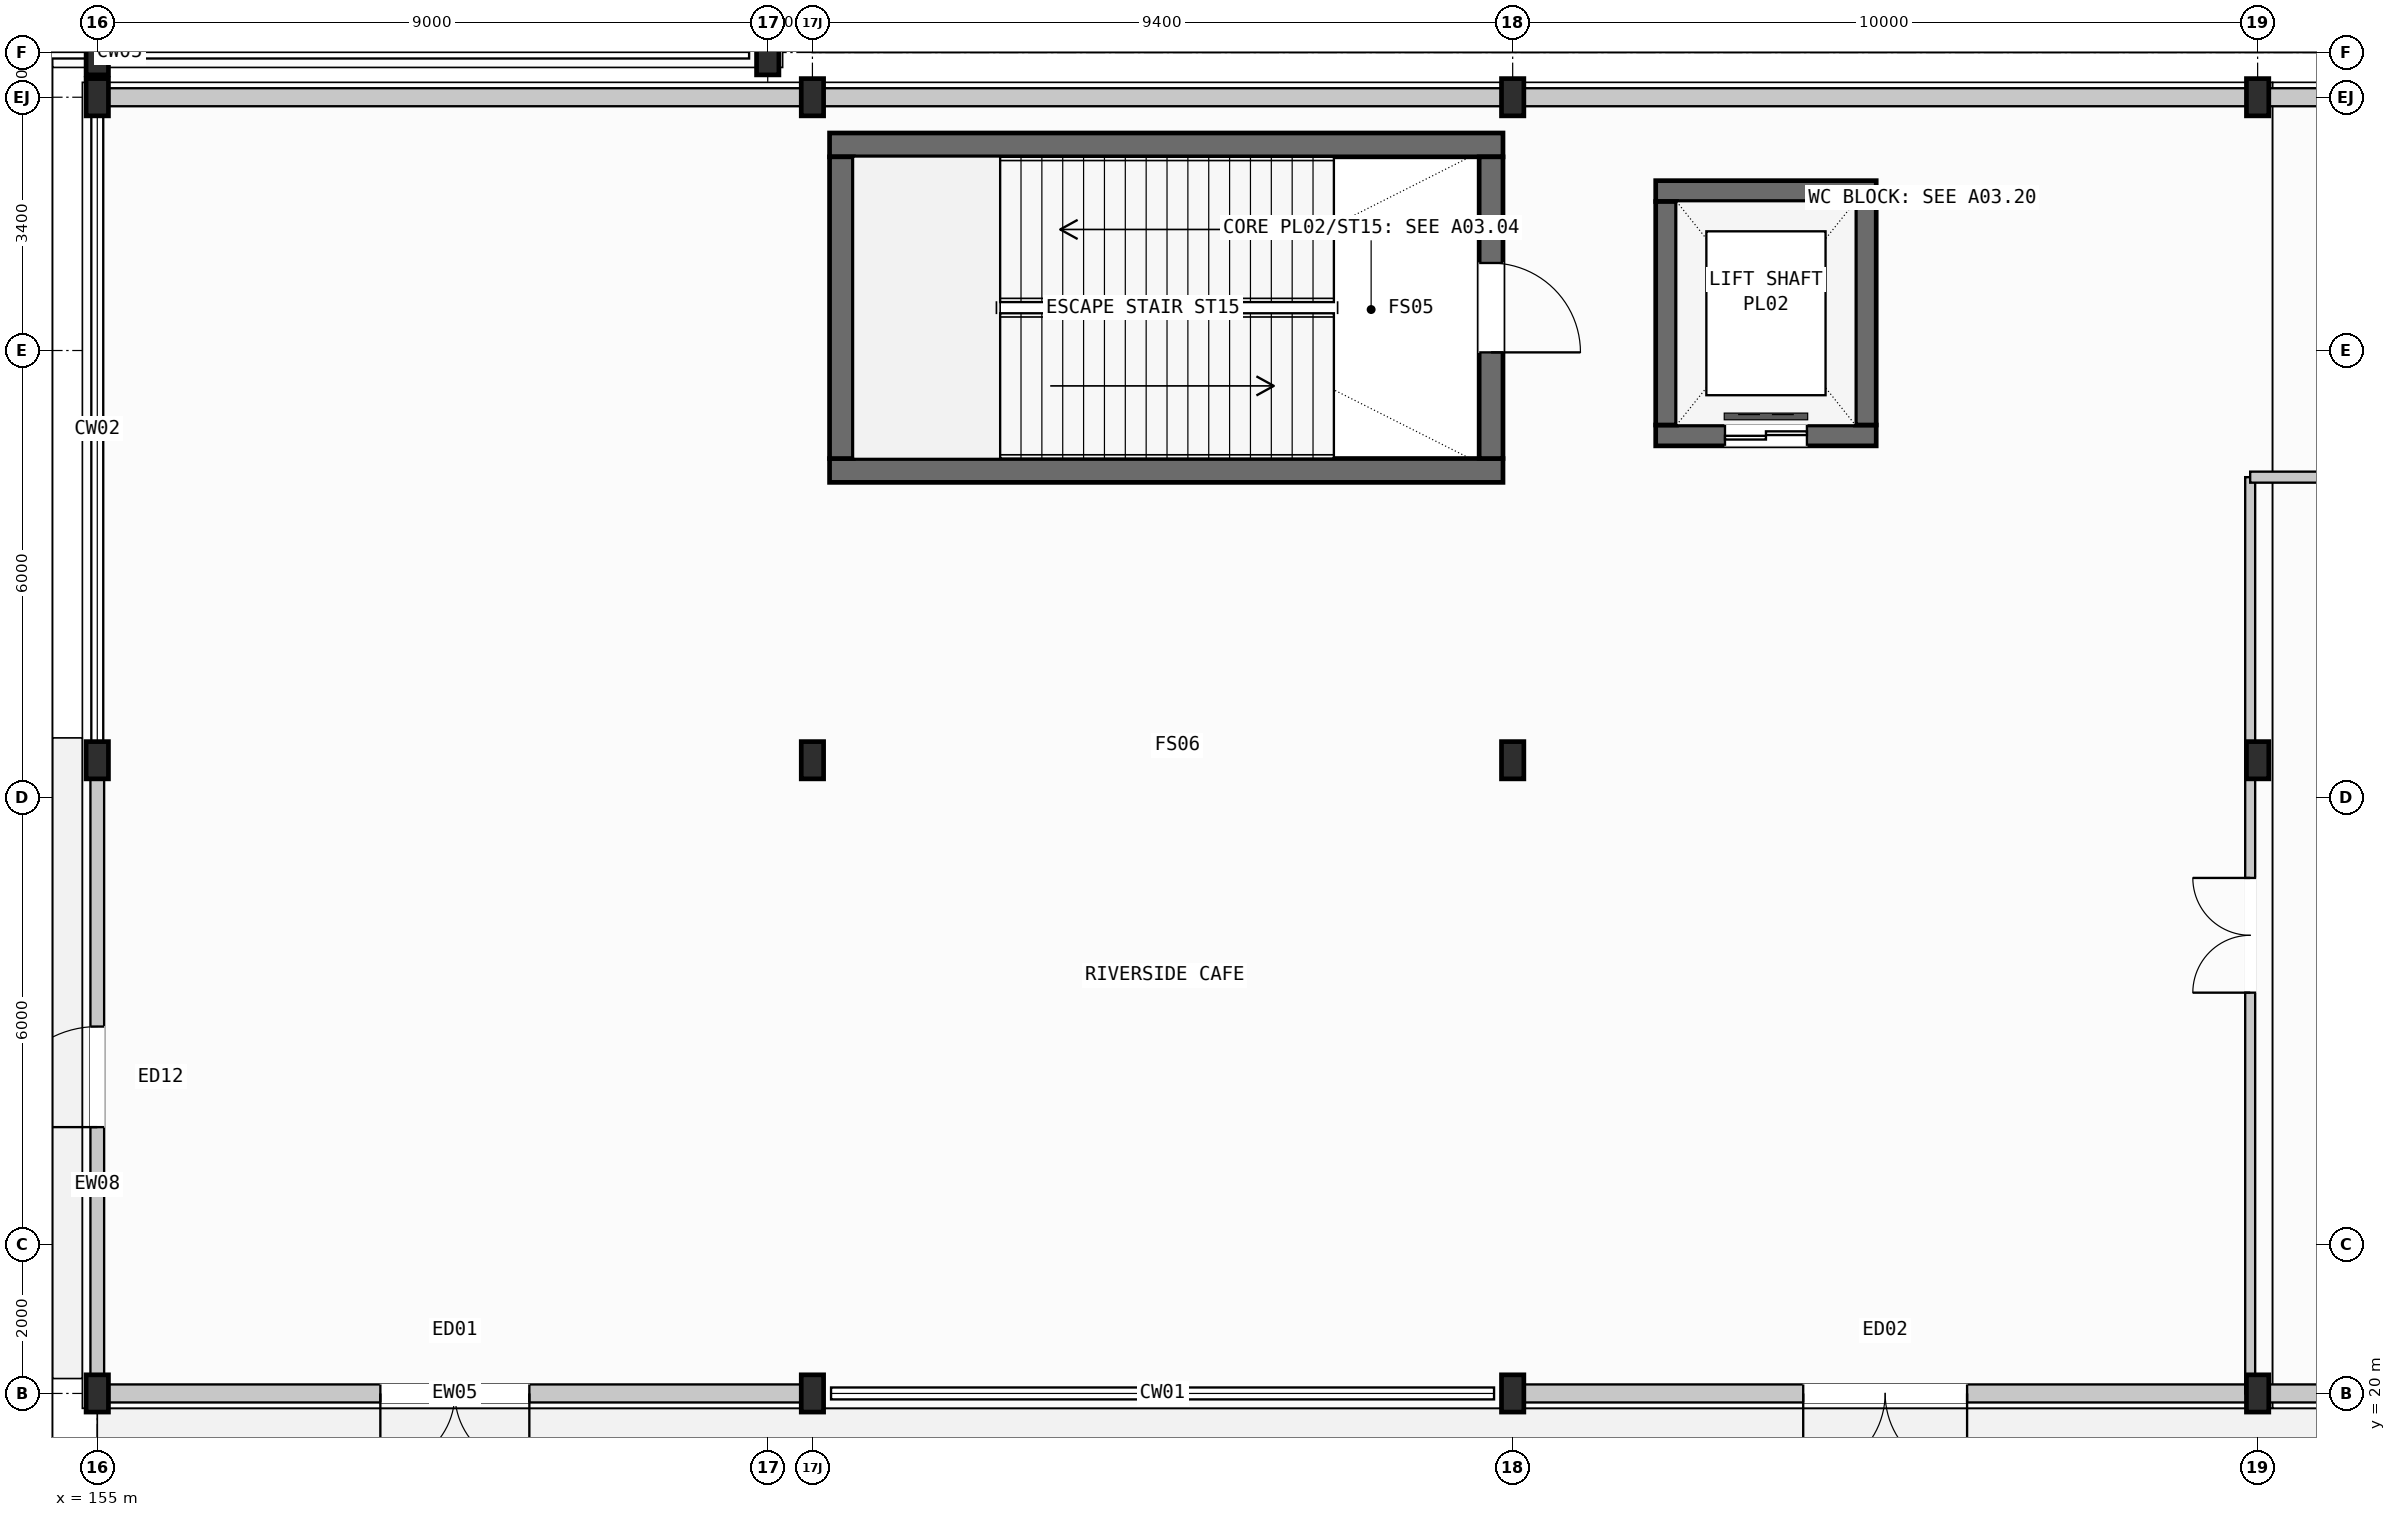
"""IFC4 building model, lengths in metres.
Left out: names, types, materials, properties, quantities, classifications, styles, units other than length and angle.
Written with IfcOpenShell. Run it as: python <this file> out.ifc"""

import sys

from ifc_helpers import new_model, si_unit, direction, frame, frame_2d, origin, origin_2d, place, context, subcontext, project, spatial, rectangle, i_section, extrude, element, fill, save


model = new_model("IFC4")
c1 = context("Model", 3, precision=1e-05, world=origin(), true_north=direction((0.0, 1.0)))
c2 = subcontext(c1, "Body", "Model", "MODEL_VIEW")
j1 = project(units=[si_unit("LENGTHUNIT", "METRE"), si_unit("PLANEANGLEUNIT", "RADIAN")], contexts=[c1])
p1 = place(None, origin())
s1 = spatial("IfcSite", under=j1, at=p1, CompositionType="ELEMENT")
p2 = place(p1, origin())
s2 = spatial("IfcBuilding", under=s1, at=p2, CompositionType="ELEMENT")
p3 = place(p2, origin())
s3 = spatial("IfcBuildingStorey", under=s2, at=p3, CompositionType="ELEMENT", Elevation=0.0)
for number, where, z_axis, x_axis in (
    (1, (155.0, 20.0, 0.0), (0.0, 0.0, 1.0), (1.0, 0.0, 0.0)),
    (2, (155.0, 28.5, 0.0), (0.0, 0.0, 1.0), (1.0, 0.0, 0.0)),
    (3, (155.0, 37.4, 0.0), (0.0, 0.0, 1.0), (1.0, 0.0, 0.0)),
):
    element("IfcColumn", number, at=place(p3, frame(where, z_axis=z_axis, x_axis=x_axis)), inside=s3, PredefinedType="COLUMN", context=c2, shape_type="SweptSolid", body=[
        extrude(i_section(OverallWidth=0.3, OverallDepth=0.5, WebThickness=0.014, FlangeThickness=0.028, FilletRadius=0.027, at=origin_2d()), origin(), (0.0, 0.0, 1.0), 6.0),
    ])
for number, where, z_axis, x_axis in (
    (4, (155.0, 38.0, 0.0), (0.0, 0.0, 1.0), (1.0, 0.0, 0.0)),
    (5, (164.0, 38.0, 0.0), (0.0, 0.0, 1.0), (1.0, 0.0, 0.0)),
):
    element("IfcColumn", number, at=place(p3, frame(where, z_axis=z_axis, x_axis=x_axis)), inside=s3, PredefinedType="COLUMN", context=c2, shape_type="SweptSolid", body=[
        extrude(i_section(OverallWidth=0.3, OverallDepth=0.6, WebThickness=0.015, FlangeThickness=0.03, FilletRadius=0.027, at=origin_2d()), origin(), (0.0, 0.0, 1.0), 6.0),
    ])
for number, where, z_axis, x_axis in (
    (6, (164.6, 20.0, 0.0), (0.0, 0.0, 1.0), (1.0, 0.0, 0.0)),
    (7, (164.6, 28.5, 0.0), (0.0, 0.0, 1.0), (1.0, 0.0, 0.0)),
    (8, (164.6, 37.4, 0.0), (0.0, 0.0, 1.0), (1.0, 0.0, 0.0)),
    (9, (174.0, 20.0, 0.0), (0.0, 0.0, 1.0), (1.0, 0.0, 0.0)),
    (10, (174.0, 28.5, 0.0), (0.0, 0.0, 1.0), (1.0, 0.0, 0.0)),
    (11, (174.0, 37.4, 0.0), (0.0, 0.0, 1.0), (1.0, 0.0, 0.0)),
    (12, (184.0, 20.0, 0.0), (0.0, 0.0, 1.0), (1.0, 0.0, 0.0)),
    (13, (184.0, 28.5, 0.0), (0.0, 0.0, 1.0), (1.0, 0.0, 0.0)),
    (14, (184.0, 37.4, 0.0), (0.0, 0.0, 1.0), (1.0, 0.0, 0.0)),
):
    element("IfcColumn", number, at=place(p3, frame(where, z_axis=z_axis, x_axis=x_axis)), inside=s3, PredefinedType="COLUMN", context=c2, shape_type="SweptSolid", body=[
        extrude(i_section(OverallWidth=0.3, OverallDepth=0.5, WebThickness=0.014, FlangeThickness=0.028, FilletRadius=0.027, at=origin_2d()), origin(), (0.0, 0.0, 1.0), 6.0),
    ])
for number, where, z_axis, x_axis in (
    (15, (164.83, 32.39, 0.0), (0.0, 0.0, 1.0), (1.0, 0.0, 0.0)),
    (16, (164.83, 36.76, 0.0), (0.0, 0.0, 1.0), (1.0, 0.0, 0.0)),
):
    element("IfcWall", number, at=place(p3, frame(where, z_axis=z_axis, x_axis=x_axis)), inside=s3, PredefinedType="SHEAR", context=c2, shape_type="SweptSolid", body=[
        extrude(rectangle(XDim=9.04, YDim=0.32, at=frame_2d((4.52, 0.0))), origin(), (0.0, 0.0, 1.0), 6.0),
    ])
p4 = place(p3, frame((164.99, 32.55, 0.0), z_axis=(0.0, 0.0, 1.0), x_axis=(0.0, 1.0, 0.0)))
e17 = element("IfcWall", 17, at=p4, inside=s3, PredefinedType="SHEAR", context=c2, shape_type="SweptSolid", body=[
    extrude(rectangle(XDim=4.05, YDim=0.32, at=frame_2d((2.025, 0.0))), origin(), (0.0, 0.0, 1.0), 6.0),
])
p5 = place(p3, frame((173.71, 32.55, 0.0), z_axis=(0.0, 0.0, 1.0), x_axis=(0.0, 1.0, 0.0)))
e18 = element("IfcWall", 18, at=p5, inside=s3, PredefinedType="SHEAR", context=c2, shape_type="SweptSolid", body=[
    extrude(rectangle(XDim=4.05, YDim=0.32, at=frame_2d((2.025, 0.0))), origin(), (0.0, 0.0, 1.0), 6.0),
])
p6 = place(p5, frame((1.425, 0.0, 0.0)))
e19 = element("IfcOpeningElement", 19, at=p6, cuts=e18, PredefinedType="OPENING", context=c2, shape_type="SweptSolid", body=[
    extrude(rectangle(XDim=1.2, YDim=2.2, at=frame_2d((0.6, 1.1))), frame((0.0, 0.17, 0.0), z_axis=(0.0, -1.0, 0.0), x_axis=(1.0, 0.0, 0.0)), (0.0, 0.0, 1.0), 0.34),
])
p7 = place(p3, frame((175.92, 32.86, 0.0), z_axis=(0.0, 0.0, 1.0), x_axis=(1.0, 0.0, 0.0)))
e20 = element("IfcWall", 20, at=p7, inside=s3, PredefinedType="SHEAR", context=c2, shape_type="SweptSolid", body=[
    extrude(rectangle(XDim=2.96, YDim=0.28, at=frame_2d((1.48, 0.0))), origin(), (0.0, 0.0, 1.0), 6.0),
])
p8 = place(p7, frame((0.93, 0.0, 0.0)))
e21 = element("IfcOpeningElement", 21, at=p8, cuts=e20, PredefinedType="OPENING", context=c2, shape_type="SweptSolid", body=[
    extrude(rectangle(XDim=1.1, YDim=2.15, at=frame_2d((0.55, 1.075))), frame((0.0, 0.15, 0.0), z_axis=(0.0, -1.0, 0.0), x_axis=(1.0, 0.0, 0.0)), (0.0, 0.0, 1.0), 0.3),
])
p9 = place(p3, frame((175.92, 36.14, 0.0), z_axis=(0.0, 0.0, 1.0), x_axis=(1.0, 0.0, 0.0)))
e22 = element("IfcWall", 22, at=p9, inside=s3, PredefinedType="SHEAR", context=c2, shape_type="SweptSolid", body=[
    extrude(rectangle(XDim=2.96, YDim=0.28, at=frame_2d((1.48, 0.0))), origin(), (0.0, 0.0, 1.0), 6.0),
])
for number, where, z_axis, x_axis in (
    (23, (176.06, 33.0, 0.0), (0.0, 0.0, 1.0), (0.0, 1.0, 0.0)),
    (24, (178.74, 33.0, 0.0), (0.0, 0.0, 1.0), (0.0, 1.0, 0.0)),
):
    element("IfcWall", number, at=place(p3, frame(where, z_axis=z_axis, x_axis=x_axis)), inside=s3, PredefinedType="SHEAR", context=c2, shape_type="SweptSolid", body=[
        extrude(rectangle(XDim=3.0, YDim=0.28, at=frame_2d((1.5, 0.0))), origin(), (0.0, 0.0, 1.0), 6.0),
    ])
p10 = place(p3, frame((155.146, 20.0, 0.0), z_axis=(0.0, 0.0, 1.0), x_axis=(1.0, 0.0, 0.0)))
e25 = element("IfcWall", 25, at=p10, inside=s3, PredefinedType="STANDARD", context=c2, shape_type="SweptSolid", body=[
    extrude(rectangle(XDim=9.308, YDim=0.242, at=frame_2d((4.654, 0.0))), origin(), (0.0, 0.0, 1.0), 5.1),
])
p11 = place(p10, frame((3.654, 0.0, 0.0)))
e26 = element("IfcOpeningElement", 26, at=p11, cuts=e25, PredefinedType="OPENING", context=c2, shape_type="SweptSolid", body=[
    extrude(rectangle(XDim=2.0, YDim=2.3, at=frame_2d((1.0, 1.15))), frame((0.0, 0.131, 0.0), z_axis=(0.0, -1.0, 0.0), x_axis=(1.0, 0.0, 0.0)), (0.0, 0.0, 1.0), 0.262),
])
p12 = place(p3, frame((155.146, 37.4, 0.0), z_axis=(0.0, 0.0, 1.0), x_axis=(1.0, 0.0, 0.0)))
e27 = element("IfcWall", 27, at=p12, inside=s3, PredefinedType="STANDARD", context=c2, shape_type="SweptSolid", body=[
    extrude(rectangle(XDim=9.308, YDim=0.242, at=frame_2d((4.654, 0.0))), origin(), (0.0, 0.0, 1.0), 5.1),
])
p13 = place(p3, frame((164.746, 37.4, 0.0), z_axis=(0.0, 0.0, 1.0), x_axis=(1.0, 0.0, 0.0)))
e28 = element("IfcWall", 28, at=p13, inside=s3, PredefinedType="STANDARD", context=c2, shape_type="SweptSolid", body=[
    extrude(rectangle(XDim=9.108, YDim=0.242, at=frame_2d((4.554, 0.0))), origin(), (0.0, 0.0, 1.0), 5.1),
])
p14 = place(p3, frame((174.146, 20.0, 0.0), z_axis=(0.0, 0.0, 1.0), x_axis=(1.0, 0.0, 0.0)))
e29 = element("IfcWall", 29, at=p14, inside=s3, PredefinedType="STANDARD", context=c2, shape_type="SweptSolid", body=[
    extrude(rectangle(XDim=9.708, YDim=0.242, at=frame_2d((4.854, 0.0))), origin(), (0.0, 0.0, 1.0), 5.1),
])
p15 = place(p14, frame((3.754, 0.0, 0.0)))
e30 = element("IfcOpeningElement", 30, at=p15, cuts=e29, PredefinedType="OPENING", context=c2, shape_type="SweptSolid", body=[
    extrude(rectangle(XDim=2.2, YDim=2.4, at=frame_2d((1.1, 1.2))), frame((0.0, 0.131, 0.0), z_axis=(0.0, -1.0, 0.0), x_axis=(1.0, 0.0, 0.0)), (0.0, 0.0, 1.0), 0.262),
])
p16 = place(p3, frame((174.146, 37.4, 0.0), z_axis=(0.0, 0.0, 1.0), x_axis=(1.0, 0.0, 0.0)))
e31 = element("IfcWall", 31, at=p16, inside=s3, PredefinedType="STANDARD", context=c2, shape_type="SweptSolid", body=[
    extrude(rectangle(XDim=9.708, YDim=0.242, at=frame_2d((4.854, 0.0))), origin(), (0.0, 0.0, 1.0), 5.1),
])
p17 = place(p3, frame((184.146, 20.0, 0.0), z_axis=(0.0, 0.0, 1.0), x_axis=(1.0, 0.0, 0.0)))
e32 = element("IfcWall", 32, at=p17, inside=s3, PredefinedType="STANDARD", context=c2, shape_type="SweptSolid", body=[
    extrude(rectangle(XDim=9.708, YDim=0.242, at=frame_2d((4.854, 0.0))), origin(), (0.0, 0.0, 1.0), 5.1),
])
p18 = place(p17, frame((5.656, 0.0, 0.0)))
e33 = element("IfcOpeningElement", 33, at=p18, cuts=e32, PredefinedType="OPENING", context=c2, shape_type="SweptSolid", body=[
    extrude(rectangle(XDim=2.0, YDim=2.3, at=frame_2d((1.0, 1.15))), frame((0.0, 0.131, 0.0), z_axis=(0.0, -1.0, 0.0), x_axis=(1.0, 0.0, 0.0)), (0.0, 0.0, 1.0), 0.262),
])
p19 = place(p3, frame((184.146, 37.4, 0.0), z_axis=(0.0, 0.0, 1.0), x_axis=(1.0, 0.0, 0.0)))
e34 = element("IfcWall", 34, at=p19, inside=s3, PredefinedType="STANDARD", context=c2, shape_type="SweptSolid", body=[
    extrude(rectangle(XDim=9.708, YDim=0.242, at=frame_2d((4.854, 0.0))), origin(), (0.0, 0.0, 1.0), 5.1),
])
p20 = place(p19, frame((4.244, 0.0, 0.0)))
e35 = element("IfcOpeningElement", 35, at=p20, cuts=e34, PredefinedType="OPENING", context=c2, shape_type="SweptSolid", body=[
    extrude(rectangle(XDim=1.22, YDim=2.28, at=frame_2d((0.61, 1.14))), frame((0.0, 0.131, 0.0), z_axis=(0.0, -1.0, 0.0), x_axis=(1.0, 0.0, 0.0)), (0.0, 0.0, 1.0), 0.262),
])
p21 = place(p3, frame((155.0, 20.246, 0.0), z_axis=(0.0, 0.0, 1.0), x_axis=(0.0, 1.0, 0.0)))
e36 = element("IfcWall", 36, at=p21, inside=s3, PredefinedType="STANDARD", context=c2, shape_type="SweptSolid", body=[
    extrude(rectangle(XDim=8.008, YDim=0.184, at=frame_2d((4.004, 0.0))), origin(), (0.0, 0.0, 1.0), 5.1),
])
p22 = place(p21, frame((3.329, 0.0, 0.0)))
e37 = element("IfcOpeningElement", 37, at=p22, cuts=e36, PredefinedType="OPENING", context=c2, shape_type="SweptSolid", body=[
    extrude(rectangle(XDim=1.35, YDim=2.32, at=frame_2d((0.675, 1.16))), frame((0.0, 0.102, 0.0), z_axis=(0.0, -1.0, 0.0), x_axis=(1.0, 0.0, 0.0)), (0.0, 0.0, 1.0), 0.204),
])
p23 = place(p3, frame((155.9, 38.0, 0.0), z_axis=(0.0, 0.0, 1.0), x_axis=(0.0, 1.0, 0.0)))
e38 = element("IfcWall", 38, at=p23, inside=s3, PredefinedType="PARTITIONING", context=c2, shape_type="SweptSolid", body=[
    extrude(rectangle(XDim=8.8, YDim=0.178, at=frame_2d((4.4, 0.0))), origin(), (0.0, 0.0, 1.0), 4.9),
])
p24 = place(p23, frame((3.91, 0.0, 0.0)))
e39 = element("IfcOpeningElement", 39, at=p24, cuts=e38, PredefinedType="OPENING", context=c2, shape_type="SweptSolid", body=[
    extrude(rectangle(XDim=0.98, YDim=2.14, at=frame_2d((0.49, 1.07))), frame((0.0, 0.099, 0.0), z_axis=(0.0, -1.0, 0.0), x_axis=(1.0, 0.0, 0.0)), (0.0, 0.0, 1.0), 0.198),
])
p25 = place(p3, frame((183.9, 20.0, 0.0), z_axis=(0.0, 0.0, 1.0), x_axis=(0.0, 1.0, 0.0)))
e40 = element("IfcWall", 40, at=p25, inside=s3, PredefinedType="PARTITIONING", context=c2, shape_type="SweptSolid", body=[
    extrude(rectangle(XDim=12.3, YDim=0.134, at=frame_2d((6.15, 0.0))), origin(), (0.0, 0.0, 1.0), 4.9),
])
p26 = place(p25, frame((5.38, 0.0, 0.0)))
e41 = element("IfcOpeningElement", 41, at=p26, cuts=e40, PredefinedType="OPENING", context=c2, shape_type="SweptSolid", body=[
    extrude(rectangle(XDim=1.54, YDim=2.24, at=frame_2d((0.77, 1.12))), frame((0.0, 0.077, 0.0), z_axis=(0.0, -1.0, 0.0), x_axis=(1.0, 0.0, 0.0)), (0.0, 0.0, 1.0), 0.154),
])
p27 = place(p3, frame((183.9, 32.3, 0.0), z_axis=(0.0, 0.0, 1.0), x_axis=(1.0, 0.0, 0.0)))
e42 = element("IfcWall", 42, at=p27, inside=s3, PredefinedType="PARTITIONING", context=c2, shape_type="SweptSolid", body=[
    extrude(rectangle(XDim=10.8, YDim=0.148, at=frame_2d((5.4, 0.0))), origin(), (0.0, 0.0, 1.0), 4.9),
])
p28 = place(p27, frame((4.93, 0.0, 0.0)))
e43 = element("IfcOpeningElement", 43, at=p28, cuts=e42, PredefinedType="OPENING", context=c2, shape_type="SweptSolid", body=[
    extrude(rectangle(XDim=0.94, YDim=2.12, at=frame_2d((0.47, 1.06))), frame((0.0, 0.084, 0.0), z_axis=(0.0, -1.0, 0.0), x_axis=(1.0, 0.0, 0.0)), (0.0, 0.0, 1.0), 0.168),
])
p29 = place(p11, frame((2.0, 0.0, 0.0), z_axis=(0.0, 0.0, 1.0), x_axis=(-1.0, 0.0, 0.0)))
e44 = element("IfcDoor", 44, at=p29, inside=s3, OperationType="DOUBLE_DOOR_SINGLE_SWING", PredefinedType="DOOR", context=c2, shape_type="SweptSolid", body=[
    extrude(rectangle(XDim=2.0, YDim=2.3, at=frame_2d((1.0, 1.15))), frame((0.0, 0.025, 0.0), z_axis=(0.0, -1.0, 0.0), x_axis=(1.0, 0.0, 0.0)), (0.0, 0.0, 1.0), 0.05),
])
fill(e26, e44)
p30 = place(p15, frame((2.2, 0.0, 0.0), z_axis=(0.0, 0.0, 1.0), x_axis=(-1.0, 0.0, 0.0)))
e45 = element("IfcDoor", 45, at=p30, inside=s3, OperationType="DOUBLE_DOOR_SINGLE_SWING", PredefinedType="DOOR", context=c2, shape_type="SweptSolid", body=[
    extrude(rectangle(XDim=2.2, YDim=2.4, at=frame_2d((1.1, 1.2))), frame((0.0, 0.025, 0.0), z_axis=(0.0, -1.0, 0.0), x_axis=(1.0, 0.0, 0.0)), (0.0, 0.0, 1.0), 0.05),
])
fill(e30, e45)
p31 = place(p22, origin())
e46 = element("IfcDoor", 46, at=p31, inside=s3, OperationType="SINGLE_SWING_LEFT", PredefinedType="DOOR", context=c2, shape_type="SweptSolid", body=[
    extrude(rectangle(XDim=1.35, YDim=2.32, at=frame_2d((0.675, 1.16))), frame((0.0, 0.025, 0.0), z_axis=(0.0, -1.0, 0.0), x_axis=(1.0, 0.0, 0.0)), (0.0, 0.0, 1.0), 0.05),
])
fill(e37, e46)
p32 = place(p6, frame((1.2, 0.0, 0.0), z_axis=(0.0, 0.0, 1.0), x_axis=(-1.0, 0.0, 0.0)))
e47 = element("IfcDoor", 47, at=p32, inside=s3, OperationType="SINGLE_SWING_RIGHT", PredefinedType="DOOR", context=c2, shape_type="SweptSolid", body=[
    extrude(rectangle(XDim=1.2, YDim=2.2, at=frame_2d((0.6, 1.1))), frame((0.0, 0.025, 0.0), z_axis=(0.0, -1.0, 0.0), x_axis=(1.0, 0.0, 0.0)), (0.0, 0.0, 1.0), 0.05),
])
fill(e19, e47)
p33 = place(p8, origin())
e48 = element("IfcDoor", 48, at=p33, inside=s3, OperationType="DOUBLE_DOOR_SLIDING", PredefinedType="DOOR", context=c2, shape_type="SweptSolid", body=[
    extrude(rectangle(XDim=1.1, YDim=2.15, at=frame_2d((0.55, 1.075))), frame((0.0, 0.025, 0.0), z_axis=(0.0, -1.0, 0.0), x_axis=(1.0, 0.0, 0.0)), (0.0, 0.0, 1.0), 0.05),
])
fill(e21, e48)
p34 = place(p26, origin())
e49 = element("IfcDoor", 49, at=p34, inside=s3, OperationType="DOUBLE_DOOR_SINGLE_SWING", PredefinedType="DOOR", context=c2, shape_type="SweptSolid", body=[
    extrude(rectangle(XDim=1.54, YDim=2.24, at=frame_2d((0.77, 1.12))), frame((0.0, 0.025, 0.0), z_axis=(0.0, -1.0, 0.0), x_axis=(1.0, 0.0, 0.0)), (0.0, 0.0, 1.0), 0.05),
])
fill(e41, e49)
save(model, sys.argv[1])
